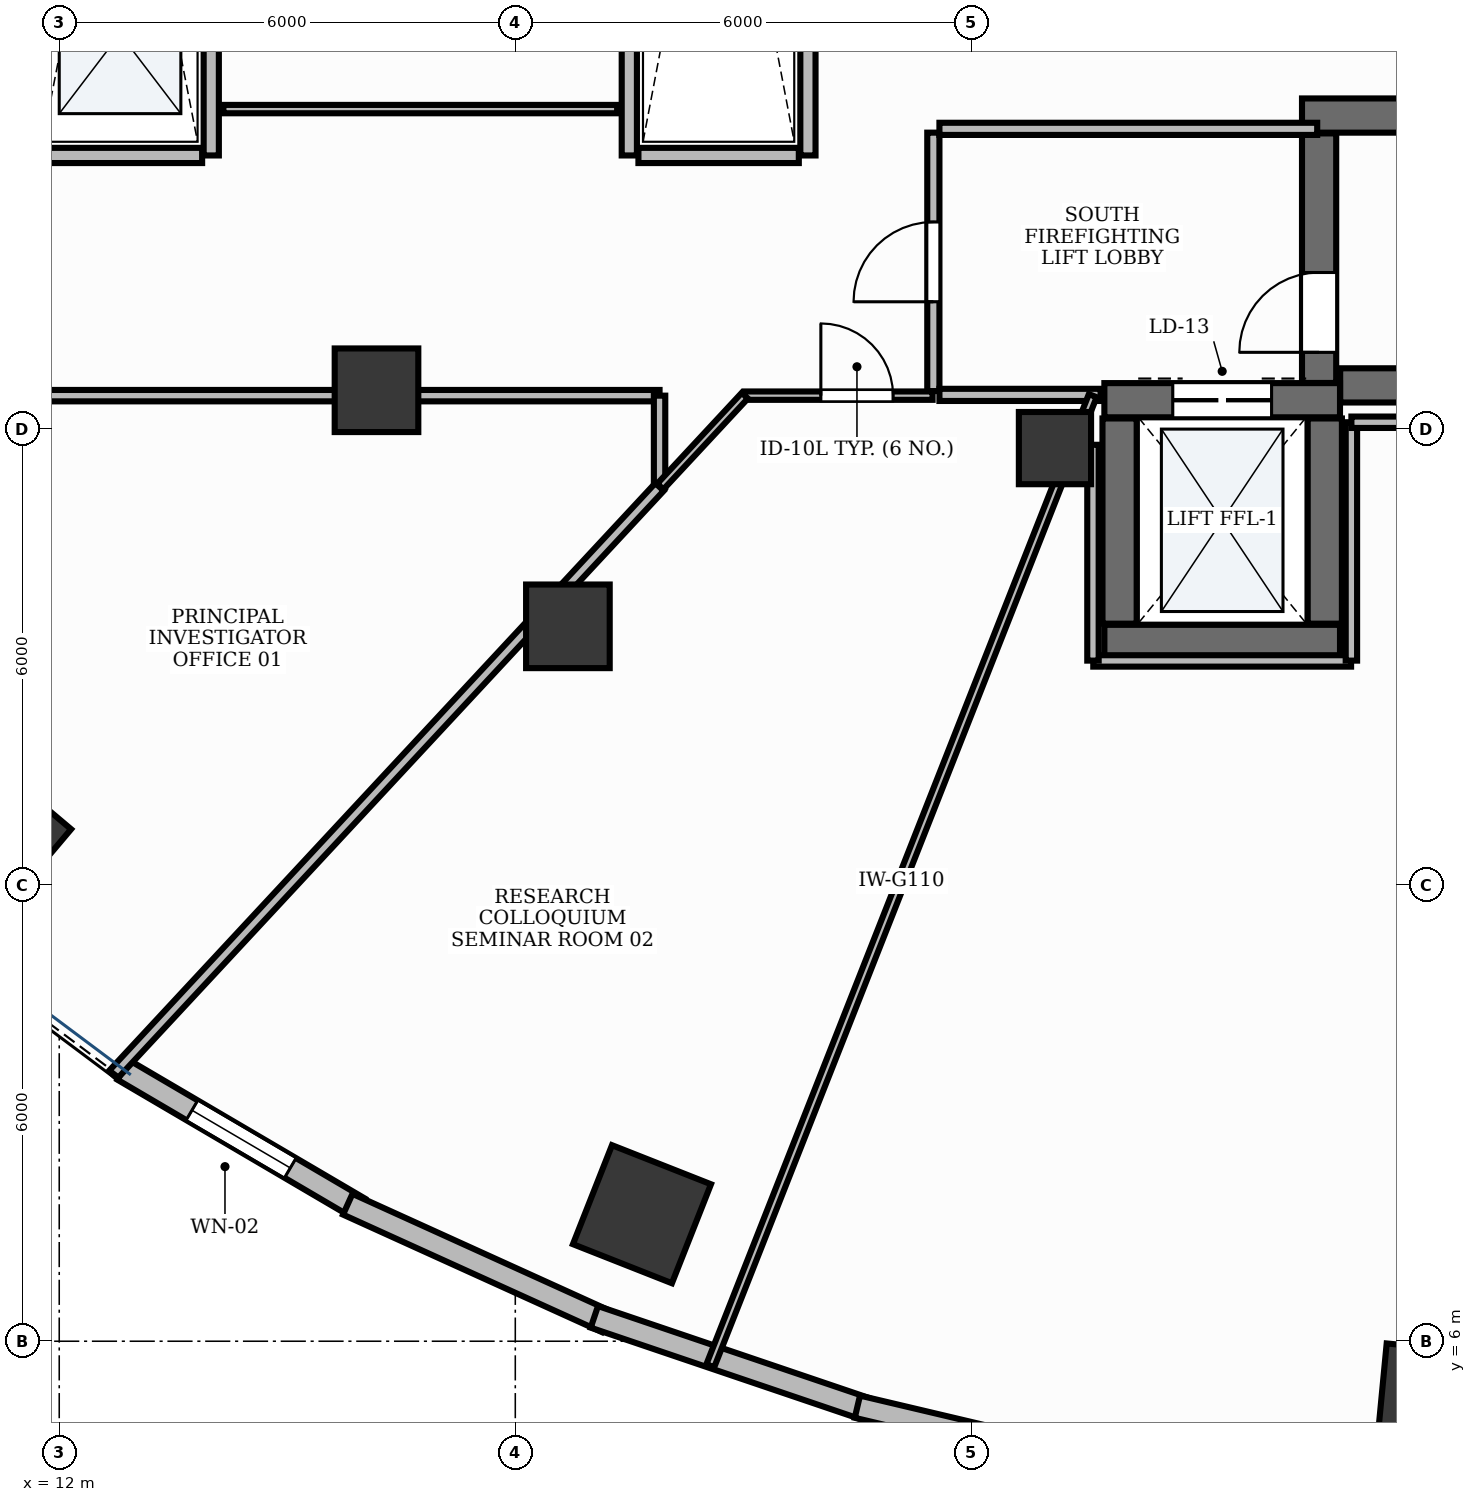
"""IFC4 building model, lengths in metres.
Left out: names, types, materials, properties, quantities, classifications, styles, units other than length and angle.
Written with IfcOpenShell. Run it as: python <this file> out.ifc"""

import sys

from ifc_helpers import new_model, si_unit, direction, frame, frame_2d, origin, origin_2d, place, context, subcontext, project, spatial, rectangle, extrude, element, fill, save


model = new_model("IFC4")
c1 = context("Model", 3, precision=1e-05, world=origin(), true_north=direction((0.0, 1.0)))
c2 = subcontext(c1, "Body", "Model", "MODEL_VIEW")
j1 = project(units=[si_unit("LENGTHUNIT", "METRE"), si_unit("PLANEANGLEUNIT", "RADIAN")], contexts=[c1])
p1 = place(None, origin())
s1 = spatial("IfcSite", under=j1, at=p1, CompositionType="ELEMENT")
p2 = place(p1, origin())
s2 = spatial("IfcBuilding", under=s1, at=p2, CompositionType="ELEMENT")
p3 = place(p2, frame((0.0, 0.0, 80.4)))
s3 = spatial("IfcBuildingStorey", under=s2, at=p3, CompositionType="ELEMENT", Elevation=80.4)
p4 = place(p3, frame((28.852, 18.575, 0.0), z_axis=(0.0, 0.0, 1.0), x_axis=(1.0, 0.0, 0.0)))
e1 = element("IfcWall", 1, at=p4, inside=s3, PredefinedType="SHEAR", context=c2, shape_type="SweptSolid", body=[
    extrude(rectangle(XDim=8.248, YDim=0.45, at=frame_2d((4.124, 0.0))), origin(), (0.0, 0.0, 1.0), 3.88),
])
p5 = place(p3, frame((28.35, 22.125, 0.0), z_axis=(0.0, 0.0, 1.0), x_axis=(1.0, 0.0, 0.0)))
e2 = element("IfcWall", 2, at=p5, inside=s3, PredefinedType="SHEAR", context=c2, shape_type="SweptSolid", body=[
    extrude(rectangle(XDim=8.75, YDim=0.45, at=frame_2d((4.375, 0.0))), origin(), (0.0, 0.0, 1.0), 3.88),
])
p6 = place(p3, frame((28.575, 18.607, 0.0), z_axis=(0.0, 0.0, 1.0), x_axis=(0.0, 1.0, 0.0)))
e3 = element("IfcWall", 3, at=p6, inside=s3, PredefinedType="SHEAR", context=c2, shape_type="SweptSolid", body=[
    extrude(rectangle(XDim=3.283, YDim=0.45, at=frame_2d((1.642, 0.0))), origin(), (0.0, 0.0, 1.0), 3.88),
])
p7 = place(p6, frame((0.403, 0.0, 0.0)))
e4 = element("IfcOpeningElement", 4, at=p7, cuts=e3, PredefinedType="OPENING", context=c2, shape_type="SweptSolid", body=[
    extrude(rectangle(XDim=1.05, YDim=2.15, at=frame_2d((0.525, 1.075))), frame((0.0, 0.24, 0.0), z_axis=(0.0, -1.0, 0.0), x_axis=(1.0, 0.0, 0.0)), (0.0, 0.0, 1.0), 0.48),
])
p8 = place(p3, frame((25.75, 15.2, 0.0), z_axis=(0.0, 0.0, 1.0), x_axis=(1.0, 0.0, 0.0)))
e5 = element("IfcWall", 5, at=p8, inside=s3, PredefinedType="SHEAR", context=c2, shape_type="SweptSolid", body=[
    extrude(rectangle(XDim=3.1, YDim=0.45, at=frame_2d((1.55, 0.0))), origin(), (0.0, 0.0, 1.0), 3.88),
])
p9 = place(p3, frame((25.75, 18.38, 0.0), z_axis=(0.0, 0.0, 1.0), x_axis=(1.0, 0.0, 0.0)))
e6 = element("IfcWall", 6, at=p9, inside=s3, PredefinedType="SHEAR", context=c2, shape_type="SweptSolid", body=[
    extrude(rectangle(XDim=3.1, YDim=0.45, at=frame_2d((1.55, 0.0))), origin(), (0.0, 0.0, 1.0), 3.88),
])
p10 = place(p9, frame((0.9, 0.0, 0.0)))
e7 = element("IfcOpeningElement", 7, at=p10, cuts=e6, PredefinedType="OPENING", context=c2, shape_type="SweptSolid", body=[
    extrude(rectangle(XDim=1.3, YDim=2.2, at=frame_2d((0.65, 1.1))), frame((0.0, 0.24, 0.0), z_axis=(0.0, -1.0, 0.0), x_axis=(1.0, 0.0, 0.0)), (0.0, 0.0, 1.0), 0.48),
])
for number, where, z_axis, x_axis in (
    (8, (25.95, 15.44, 0.0), (0.0, 0.0, 1.0), (0.0, 1.0, 0.0)),
    (9, (28.65, 15.44, 0.0), (0.0, 0.0, 1.0), (0.0, 1.0, 0.0)),
):
    element("IfcWall", number, at=place(p3, frame(where, z_axis=z_axis, x_axis=x_axis)), inside=s3, PredefinedType="SHEAR", context=c2, shape_type="SweptSolid", body=[
        extrude(rectangle(XDim=2.7, YDim=0.45, at=frame_2d((1.35, 0.0))), origin(), (0.0, 0.0, 1.0), 3.88),
    ])
p11 = place(p3, frame((25.1, 17.75, -0.0), z_axis=(0.0, 0.0, 1.0), x_axis=(1.0, 0.0, 0.0)))
e10 = element("IfcColumn", 10, at=p11, inside=s3, PredefinedType="PILASTER", context=c2, shape_type="SweptSolid", body=[
    extrude(rectangle(XDim=0.95, YDim=0.95, at=origin_2d()), origin(), (0.0, 0.0, 1.0), 3.881),
])
p12 = place(p3, frame((16.174, 18.511, -0.0), z_axis=(0.0, 0.0, 1.0), x_axis=(1.0, 0.0, 0.0)))
e11 = element("IfcColumn", 11, at=p12, inside=s3, PredefinedType="COLUMN", context=c2, shape_type="SweptSolid", body=[
    extrude(rectangle(XDim=1.1, YDim=1.1, at=origin_2d()), origin(), (0.0, 0.0, 1.0), 3.881),
])
p13 = place(p3, frame((11.17, 12.653, -0.0), z_axis=(0.0, 0.0, 1.0), x_axis=(-0.764246456939, 0.644924300253, 0.0)))
e12 = element("IfcColumn", 12, at=p13, inside=s3, PredefinedType="COLUMN", context=c2, shape_type="SweptSolid", body=[
    extrude(rectangle(XDim=1.4, YDim=1.4, at=origin_2d()), origin(), (0.0, 0.0, 1.0), 3.881),
])
p14 = place(p3, frame((18.692, 15.405, -0.0), z_axis=(0.0, 0.0, 1.0), x_axis=(1.0, 0.0, 0.0)))
e13 = element("IfcColumn", 13, at=p14, inside=s3, PredefinedType="COLUMN", context=c2, shape_type="SweptSolid", body=[
    extrude(rectangle(XDim=1.1, YDim=1.1, at=origin_2d()), origin(), (0.0, 0.0, 1.0), 3.881),
])
for number, where, z_axis, x_axis in (
    (14, (19.667, 7.671, -0.0), (0.0, 0.0, 1.0), (-0.93, 0.367, 0.0)),
    (15, (30.094, 5.208, -0.0), (0.0, 0.0, 1.0), (-0.995, 0.095, 0.0)),
):
    element("IfcColumn", number, at=place(p3, frame(where, z_axis=z_axis, x_axis=x_axis)), inside=s3, PredefinedType="COLUMN", context=c2, shape_type="SweptSolid", body=[
        extrude(rectangle(XDim=1.4, YDim=1.4, at=origin_2d()), origin(), (0.0, 0.0, 1.0), 3.881),
    ])
p15 = place(p3, frame((12.843, 9.569, 0.0), z_axis=(0.0, 0.0, 1.0), x_axis=(0.862473134325, -0.506102847817, 0.0)))
e16 = element("IfcWall", 16, at=p15, inside=s3, PredefinedType="STANDARD", context=c2, shape_type="SweptSolid", body=[
    extrude(rectangle(XDim=3.595, YDim=0.3, at=frame_2d((1.798, 0.0))), origin(), (0.0, 0.0, 1.0), 3.88),
])
p16 = place(p15, frame((1.048, 0.0, 0.95)))
e17 = element("IfcOpeningElement", 17, at=p16, cuts=e16, PredefinedType="OPENING", context=c2, shape_type="SweptSolid", body=[
    extrude(rectangle(XDim=1.5, YDim=1.8, at=frame_2d((0.75, 0.9))), frame((0.0, 0.165, 0.0), z_axis=(0.0, -1.0, 0.0), x_axis=(1.0, 0.0, 0.0)), (0.0, 0.0, 1.0), 0.33),
])
p17 = place(p3, frame((15.796, 7.802, 0.0), z_axis=(0.0, 0.0, 1.0), x_axis=(0.910623406862, -0.413237233166, 0.0)))
e18 = element("IfcWall", 18, at=p17, inside=s3, PredefinedType="STANDARD", context=c2, shape_type="SweptSolid", body=[
    extrude(rectangle(XDim=3.74, YDim=0.3, at=frame_2d((1.87, 0.0))), origin(), (0.0, 0.0, 1.0), 3.88),
])
p18 = place(p3, frame((19.04, 6.321, 0.0), z_axis=(0.0, 0.0, 1.0), x_axis=(0.94702579403, -0.321157508773, 0.0)))
e19 = element("IfcWall", 19, at=p18, inside=s3, PredefinedType="STANDARD", context=c2, shape_type="SweptSolid", body=[
    extrude(rectangle(XDim=3.83, YDim=0.3, at=frame_2d((1.915, 0.0))), origin(), (0.0, 0.0, 1.0), 3.88),
])
p19 = place(p3, frame((22.5, 5.138, 0.0), z_axis=(0.0, 0.0, 1.0), x_axis=(0.973197600754, -0.229970497863, 0.0)))
e20 = element("IfcWall", 20, at=p19, inside=s3, PredefinedType="STANDARD", context=c2, shape_type="SweptSolid", body=[
    extrude(rectangle(XDim=3.901, YDim=0.3, at=frame_2d((1.951, 0.0))), origin(), (0.0, 0.0, 1.0), 3.88),
])
p20 = place(p3, frame((14.0, 21.6, 0.0), z_axis=(0.0, 0.0, 1.0), x_axis=(0.0, 1.0, 0.0)))
e21 = element("IfcWall", 21, at=p20, inside=s3, PredefinedType="PARTITIONING", context=c2, shape_type="SweptSolid", body=[
    extrude(rectangle(XDim=10.8, YDim=0.2, at=frame_2d((5.4, 0.0))), origin(), (0.0, 0.0, 1.0), 2.22),
])
p21 = place(p3, frame((11.72, 21.6, 0.0), z_axis=(0.0, 0.0, 1.0), x_axis=(1.0, 0.0, 0.0)))
e22 = element("IfcWall", 22, at=p21, inside=s3, PredefinedType="PARTITIONING", context=c2, shape_type="SweptSolid", body=[
    extrude(rectangle(XDim=2.16, YDim=0.2, at=frame_2d((1.08, 0.0))), origin(), (0.0, 0.0, 1.0), 2.22),
])
for number, where, z_axis, x_axis in (
    (23, (19.5, 21.6, 0.0), (0.0, 0.0, 1.0), (0.0, 1.0, 0.0)),
    (24, (21.85, 21.6, 0.0), (0.0, 0.0, 1.0), (0.0, 1.0, 0.0)),
):
    element("IfcWall", number, at=place(p3, frame(where, z_axis=z_axis, x_axis=x_axis)), inside=s3, PredefinedType="PARTITIONING", context=c2, shape_type="SweptSolid", body=[
        extrude(rectangle(XDim=10.8, YDim=0.2, at=frame_2d((5.4, 0.0))), origin(), (0.0, 0.0, 1.0), 2.22),
    ])
p22 = place(p3, frame((19.62, 21.6, 0.0), z_axis=(0.0, 0.0, 1.0), x_axis=(1.0, 0.0, 0.0)))
e25 = element("IfcWall", 25, at=p22, inside=s3, PredefinedType="PARTITIONING", context=c2, shape_type="SweptSolid", body=[
    extrude(rectangle(XDim=2.11, YDim=0.2, at=frame_2d((1.055, 0.0))), origin(), (0.0, 0.0, 1.0), 2.22),
])
p23 = place(p3, frame((23.5, 18.5, 0.0), z_axis=(0.0, 0.0, 1.0), x_axis=(0.0, 1.0, 0.0)))
e26 = element("IfcWall", 26, at=p23, inside=s3, PredefinedType="PARTITIONING", context=c2, shape_type="SweptSolid", body=[
    extrude(rectangle(XDim=3.4, YDim=0.16, at=frame_2d((1.7, 0.0))), origin(), (0.0, 0.0, 1.0), 2.22),
])
p24 = place(p23, frame((1.175, 0.0, 0.0)))
e27 = element("IfcOpeningElement", 27, at=p24, cuts=e26, PredefinedType="OPENING", context=c2, shape_type="SweptSolid", body=[
    extrude(rectangle(XDim=1.05, YDim=2.15, at=frame_2d((0.525, 1.075))), frame((0.0, 0.095, 0.0), z_axis=(0.0, -1.0, 0.0), x_axis=(1.0, 0.0, 0.0)), (0.0, 0.0, 1.0), 0.19),
])
p25 = place(p3, frame((23.58, 21.95, 0.0), z_axis=(0.0, 0.0, 1.0), x_axis=(1.0, 0.0, 0.0)))
e28 = element("IfcWall", 28, at=p25, inside=s3, PredefinedType="PARTITIONING", context=c2, shape_type="SweptSolid", body=[
    extrude(rectangle(XDim=4.97, YDim=0.16, at=frame_2d((2.485, 0.0))), origin(), (0.0, 0.0, 1.0), 2.22),
])
p26 = place(p3, frame((23.58, 18.45, 0.0), z_axis=(0.0, 0.0, 1.0), x_axis=(1.0, 0.0, 0.0)))
e29 = element("IfcWall", 29, at=p26, inside=s3, PredefinedType="PARTITIONING", context=c2, shape_type="SweptSolid", body=[
    extrude(rectangle(XDim=2.12, YDim=0.16, at=frame_2d((1.06, 0.0))), origin(), (0.0, 0.0, 1.0), 2.22),
])
p27 = place(p3, frame((21.02, 18.44, 0.0), z_axis=(0.0, 0.0, 1.0), x_axis=(1.0, 0.0, 0.0)))
e30 = element("IfcWall", 30, at=p27, inside=s3, PredefinedType="MOVABLE", context=c2, shape_type="SweptSolid", body=[
    extrude(rectangle(XDim=2.47, YDim=0.11, at=frame_2d((1.235, 0.0))), origin(), (0.0, 0.0, 1.0), 2.22),
])
p28 = place(p27, frame((1.0, 0.0, 0.0)))
e31 = element("IfcOpeningElement", 31, at=p28, cuts=e30, PredefinedType="OPENING", context=c2, shape_type="SweptSolid", body=[
    extrude(rectangle(XDim=0.95, YDim=2.15, at=frame_2d((0.475, 1.075))), frame((0.0, 0.07, 0.0), z_axis=(0.0, -1.0, 0.0), x_axis=(1.0, 0.0, 0.0)), (0.0, 0.0, 1.0), 0.14),
])
p29 = place(p3, frame((11.59, 18.44, 0.0), z_axis=(0.0, 0.0, 1.0), x_axis=(1.0, 0.0, 0.0)))
e32 = element("IfcWall", 32, at=p29, inside=s3, PredefinedType="PARTITIONING", context=c2, shape_type="SweptSolid", body=[
    extrude(rectangle(XDim=8.308, YDim=0.15, at=frame_2d((4.154, 0.0))), origin(), (0.0, 0.0, 1.0), 2.22),
])
p30 = place(p3, frame((19.898, 18.44, 0.0), z_axis=(0.0, 0.0, 1.0), x_axis=(0.0, -1.0, 0.0)))
e33 = element("IfcWall", 33, at=p30, inside=s3, PredefinedType="PARTITIONING", context=c2, shape_type="SweptSolid", body=[
    extrude(rectangle(XDim=1.201, YDim=0.15, at=frame_2d((0.6, 0.0))), origin(), (0.0, 0.0, 1.0), 2.22),
])
p31 = place(p3, frame((19.898, 17.239, 0.0), z_axis=(0.0, 0.0, 1.0), x_axis=(-0.680819073157, -0.732451629547, 0.0)))
e34 = element("IfcWall", 34, at=p31, inside=s3, PredefinedType="PARTITIONING", context=c2, shape_type="SweptSolid", body=[
    extrude(rectangle(XDim=10.559, YDim=0.15, at=frame_2d((5.279, 0.0))), origin(), (0.0, 0.0, 1.0), 2.22),
])
p32 = place(p3, frame((25.597, 18.44, 0.0), z_axis=(0.0, 0.0, 1.0), x_axis=(-0.366756051999, -0.930317149322, 0.0)))
e35 = element("IfcWall", 35, at=p32, inside=s3, PredefinedType="MOVABLE", context=c2, shape_type="SweptSolid", body=[
    extrude(rectangle(XDim=13.719, YDim=0.11, at=frame_2d((6.859, 0.0))), origin(), (0.0, 0.0, 1.0), 2.22),
])
p33 = place(p3, frame((19.908, 17.244, 0.0), z_axis=(0.0, 0.0, 1.0), x_axis=(0.680846676947, 0.732425970655, 0.0)))
e36 = element("IfcWall", 36, at=p33, inside=s3, PredefinedType="MOVABLE", context=c2, shape_type="SweptSolid", body=[
    extrude(rectangle(XDim=1.633, YDim=0.11, at=frame_2d((0.816, 0.0))), origin(), (0.0, 0.0, 1.0), 2.22),
])
p34 = place(p3, frame((25.604, 14.95, 0.0), z_axis=(0.0, 0.0, 1.0), x_axis=(1.0, 0.0, 0.0)))
e37 = element("IfcWall", 37, at=p34, inside=s3, PredefinedType="PARTITIONING", context=c2, shape_type="SweptSolid", body=[
    extrude(rectangle(XDim=3.392, YDim=0.15, at=frame_2d((1.696, 0.0))), origin(), (0.0, 0.0, 1.0), 2.22),
])
p35 = place(p3, frame((29.0, 14.954, 0.0), z_axis=(0.0, 0.0, 1.0), x_axis=(0.0, 1.0, 0.0)))
e38 = element("IfcWall", 38, at=p35, inside=s3, PredefinedType="PARTITIONING", context=c2, shape_type="SweptSolid", body=[
    extrude(rectangle(XDim=3.136, YDim=0.15, at=frame_2d((1.568, 0.0))), origin(), (0.0, 0.0, 1.0), 2.22),
])
p36 = place(p3, frame((29.0, 18.09, 0.0), z_axis=(0.0, 0.0, 1.0), x_axis=(1.0, 0.0, 0.0)))
e39 = element("IfcWall", 39, at=p36, inside=s3, PredefinedType="PARTITIONING", context=c2, shape_type="SweptSolid", body=[
    extrude(rectangle(XDim=8.35, YDim=0.15, at=frame_2d((4.175, 0.0))), origin(), (0.0, 0.0, 1.0), 2.22),
])
p37 = place(p3, frame((25.6, 17.793, 0.0), z_axis=(0.0, 0.0, 1.0), x_axis=(0.0, -1.0, 0.0)))
e40 = element("IfcWall", 40, at=p37, inside=s3, PredefinedType="PARTITIONING", context=c2, shape_type="SweptSolid", body=[
    extrude(rectangle(XDim=2.839, YDim=0.15, at=frame_2d((1.42, 0.0))), origin(), (0.0, 0.0, 1.0), 2.22),
])
p38 = place(p3, frame((19.34, 22.21, 0.0), z_axis=(0.0, 0.0, 1.0), x_axis=(-1.0, 0.0, 0.0)))
e41 = element("IfcWall", 41, at=p38, inside=s3, PredefinedType="MOVABLE", context=c2, shape_type="SweptSolid", body=[
    extrude(rectangle(XDim=5.18, YDim=0.11, at=frame_2d((2.59, 0.0))), origin(), (0.0, 0.0, 1.0), 2.22),
])
p39 = place(p16, origin())
e42 = element("IfcWindow", 42, at=p39, inside=s3, PartitioningType="DOUBLE_PANEL_VERTICAL", PredefinedType="WINDOW", context=c2, shape_type="SweptSolid", body=[
    extrude(rectangle(XDim=1.5, YDim=1.8, at=frame_2d((0.75, 0.9))), frame((0.0, 0.03, 0.0), z_axis=(0.0, -1.0, 0.0), x_axis=(1.0, 0.0, 0.0)), (0.0, 0.0, 1.0), 0.06),
])
fill(e17, e42)
p40 = place(p7, origin())
e43 = element("IfcDoor", 43, at=p40, inside=s3, OperationType="SINGLE_SWING_LEFT", PredefinedType="DOOR", context=c2, shape_type="SweptSolid", body=[
    extrude(rectangle(XDim=1.05, YDim=2.15, at=frame_2d((0.525, 1.075))), frame((0.0, 0.025, 0.0), z_axis=(0.0, -1.0, 0.0), x_axis=(1.0, 0.0, 0.0)), (0.0, 0.0, 1.0), 0.05),
])
fill(e4, e43)
p41 = place(p10, origin())
e44 = element("IfcDoor", 44, at=p41, inside=s3, OperationType="DOUBLE_DOOR_SLIDING", PredefinedType="DOOR", context=c2, shape_type="SweptSolid", body=[
    extrude(rectangle(XDim=1.3, YDim=2.2, at=frame_2d((0.65, 1.1))), frame((0.0, 0.025, 0.0), z_axis=(0.0, -1.0, 0.0), x_axis=(1.0, 0.0, 0.0)), (0.0, 0.0, 1.0), 0.05),
])
fill(e7, e44)
p42 = place(p24, origin())
e45 = element("IfcDoor", 45, at=p42, inside=s3, OperationType="SINGLE_SWING_LEFT", PredefinedType="DOOR", context=c2, shape_type="SweptSolid", body=[
    extrude(rectangle(XDim=1.05, YDim=2.15, at=frame_2d((0.525, 1.075))), frame((0.0, 0.025, 0.0), z_axis=(0.0, -1.0, 0.0), x_axis=(1.0, 0.0, 0.0)), (0.0, 0.0, 1.0), 0.05),
])
fill(e27, e45)
p43 = place(p28, origin())
e46 = element("IfcDoor", 46, at=p43, inside=s3, OperationType="SINGLE_SWING_LEFT", PredefinedType="DOOR", context=c2, shape_type="SweptSolid", body=[
    extrude(rectangle(XDim=0.95, YDim=2.15, at=frame_2d((0.475, 1.075))), frame((0.0, 0.025, 0.0), z_axis=(0.0, -1.0, 0.0), x_axis=(1.0, 0.0, 0.0)), (0.0, 0.0, 1.0), 0.05),
])
fill(e31, e46)
save(model, sys.argv[1])
